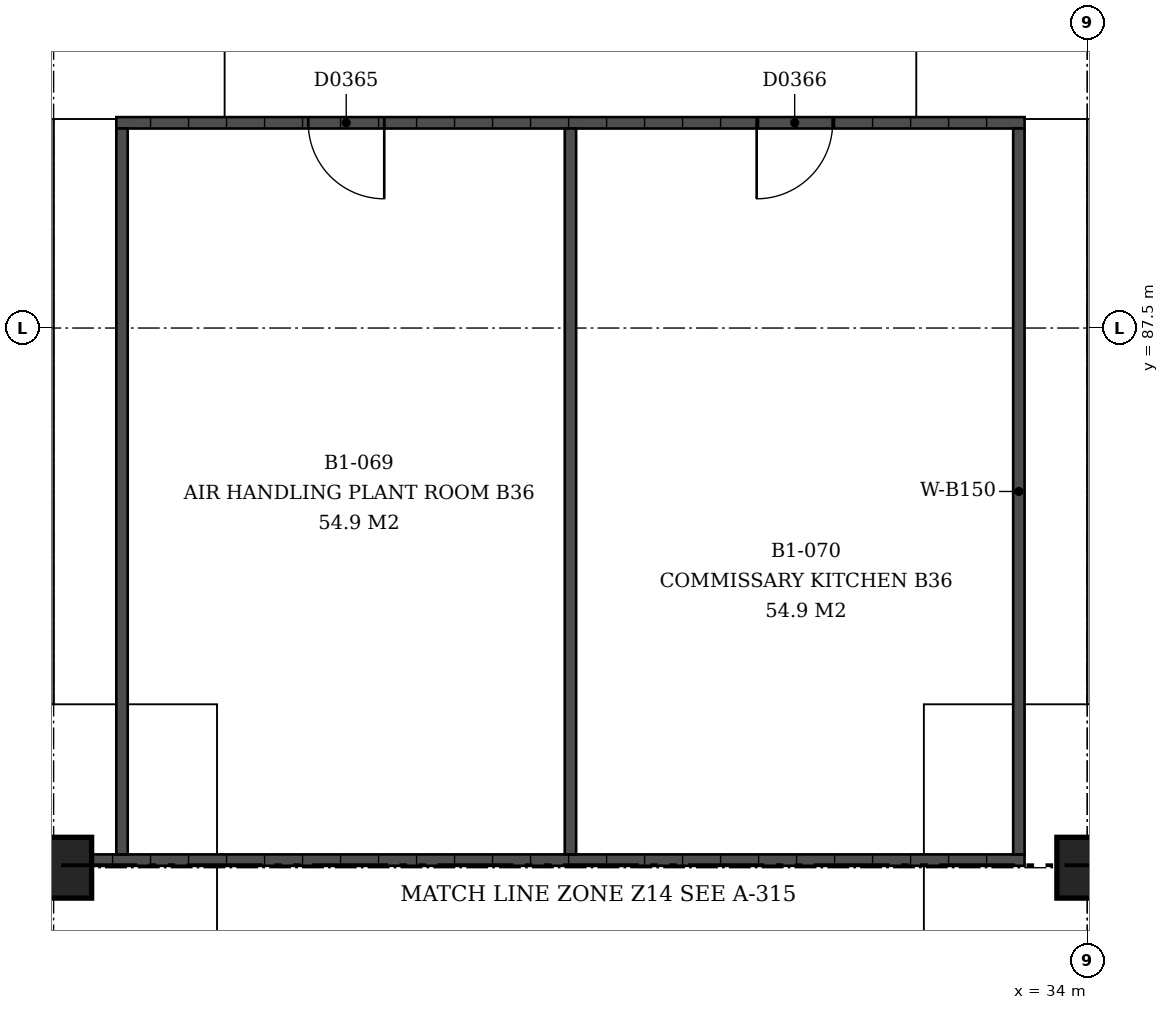
"""IFC4 building model, lengths in metres.
Left out: names, types, materials, properties, quantities, classifications, styles, units other than length and angle.
Written with IfcOpenShell. Run it as: python <this file> out.ifc"""

import sys

from ifc_helpers import new_model, si_unit, direction, frame, frame_2d, origin, origin_2d, place, context, subcontext, project, spatial, rectangle, extrude, element, fill, save


model = new_model("IFC4")
c1 = context("Model", 3, precision=1e-05, world=origin(), true_north=direction((0.0, 1.0)))
c2 = subcontext(c1, "Body", "Model", "MODEL_VIEW")
j1 = project(units=[si_unit("LENGTHUNIT", "METRE"), si_unit("PLANEANGLEUNIT", "RADIAN")], contexts=[c1])
p1 = place(None, origin())
s1 = spatial("IfcSite", under=j1, at=p1, CompositionType="ELEMENT")
p2 = place(p1, origin())
s2 = spatial("IfcBuilding", under=s1, at=p2, CompositionType="ELEMENT")
p3 = place(p2, frame((0.0, 0.0, -4.5)))
s3 = spatial("IfcBuildingStorey", under=s2, at=p3, CompositionType="ELEMENT", Elevation=-4.5)
p4 = place(p3, frame((20.4, 80.4, 0.0), z_axis=(0.0, 0.0, 1.0), x_axis=(-1.0, 0.0, 0.0)))
e1 = element("IfcColumn", 1, at=p4, inside=s3, PredefinedType="COLUMN", context=c2, shape_type="SweptSolid", body=[
    extrude(rectangle(XDim=1.0, YDim=0.8, at=origin_2d()), origin(), (0.0, 0.0, 1.0), 4.5),
])
p5 = place(p3, frame((34.0, 80.4, 0.0), z_axis=(0.0, 0.0, 1.0), x_axis=(-1.0, 0.0, 0.0)))
e2 = element("IfcColumn", 2, at=p5, inside=s3, PredefinedType="COLUMN", context=c2, shape_type="SweptSolid", body=[
    extrude(rectangle(XDim=0.8, YDim=0.8, at=origin_2d()), origin(), (0.0, 0.0, 1.0), 4.5),
])
p6 = place(p3, frame((20.9, 80.5, 0.0), z_axis=(0.0, 0.0, 1.0), x_axis=(1.0, 0.0, 0.0)))
e3 = element("IfcWall", 3, at=p6, inside=s3, PredefinedType="SOLIDWALL", context=c2, shape_type="SweptSolid", body=[
    extrude(rectangle(XDim=12.275, YDim=0.15, at=frame_2d((6.138, 0.0))), origin(), (0.0, 0.0, 1.0), 3.0),
])
p7 = place(p3, frame((21.225, 90.2, 0.0), z_axis=(0.0, 0.0, 1.0), x_axis=(1.0, 0.0, 0.0)))
e4 = element("IfcWall", 4, at=p7, inside=s3, PredefinedType="SOLIDWALL", context=c2, shape_type="SweptSolid", body=[
    extrude(rectangle(XDim=11.95, YDim=0.15, at=frame_2d((5.975, 0.0))), origin(), (0.0, 0.0, 1.0), 3.0),
])
p8 = place(p7, frame((2.525, 0.0, 0.0)))
e5 = element("IfcOpeningElement", 5, at=p8, cuts=e4, PredefinedType="OPENING", context=c2, shape_type="SweptSolid", body=[
    extrude(rectangle(XDim=1.0, YDim=2.1, at=frame_2d((0.5, 1.05))), frame((0.0, 0.075, 0.0), z_axis=(0.0, -1.0, 0.0), x_axis=(1.0, 0.0, 0.0)), (0.0, 0.0, 1.0), 0.15),
])
p9 = place(p7, frame((8.425, 0.0, 0.0)))
e6 = element("IfcOpeningElement", 6, at=p9, cuts=e4, PredefinedType="OPENING", context=c2, shape_type="SweptSolid", body=[
    extrude(rectangle(XDim=1.0, YDim=2.1, at=frame_2d((0.5, 1.05))), frame((0.0, 0.075, 0.0), z_axis=(0.0, -1.0, 0.0), x_axis=(1.0, 0.0, 0.0)), (0.0, 0.0, 1.0), 0.15),
])
for number, where, z_axis, x_axis in (
    (7, (21.3, 80.575, 0.0), (0.0, 0.0, 1.0), (0.0, 1.0, 0.0)),
    (8, (27.2, 80.575, 0.0), (0.0, 0.0, 1.0), (0.0, 1.0, 0.0)),
    (9, (33.1, 80.575, 0.0), (0.0, 0.0, 1.0), (0.0, 1.0, 0.0)),
):
    element("IfcWall", number, at=place(p3, frame(where, z_axis=z_axis, x_axis=x_axis)), inside=s3, PredefinedType="SOLIDWALL", context=c2, shape_type="SweptSolid", body=[
        extrude(rectangle(XDim=9.55, YDim=0.15, at=frame_2d((4.775, 0.0))), origin(), (0.0, 0.0, 1.0), 3.0),
    ])
p10 = place(p8, origin())
e10 = element("IfcDoor", 10, at=p10, inside=s3, OperationType="SINGLE_SWING_RIGHT", PredefinedType="DOOR", context=c2, shape_type="SweptSolid", body=[
    extrude(rectangle(XDim=1.0, YDim=2.1, at=frame_2d((0.5, 1.05))), frame((0.0, 0.025, 0.0), z_axis=(0.0, -1.0, 0.0), x_axis=(1.0, 0.0, 0.0)), (0.0, 0.0, 1.0), 0.05),
])
fill(e5, e10)
p11 = place(p9, origin())
e11 = element("IfcDoor", 11, at=p11, inside=s3, OperationType="SINGLE_SWING_LEFT", PredefinedType="DOOR", context=c2, shape_type="SweptSolid", body=[
    extrude(rectangle(XDim=1.0, YDim=2.1, at=frame_2d((0.5, 1.05))), frame((0.0, 0.025, 0.0), z_axis=(0.0, -1.0, 0.0), x_axis=(1.0, 0.0, 0.0)), (0.0, 0.0, 1.0), 0.05),
])
fill(e6, e11)
save(model, sys.argv[1])
